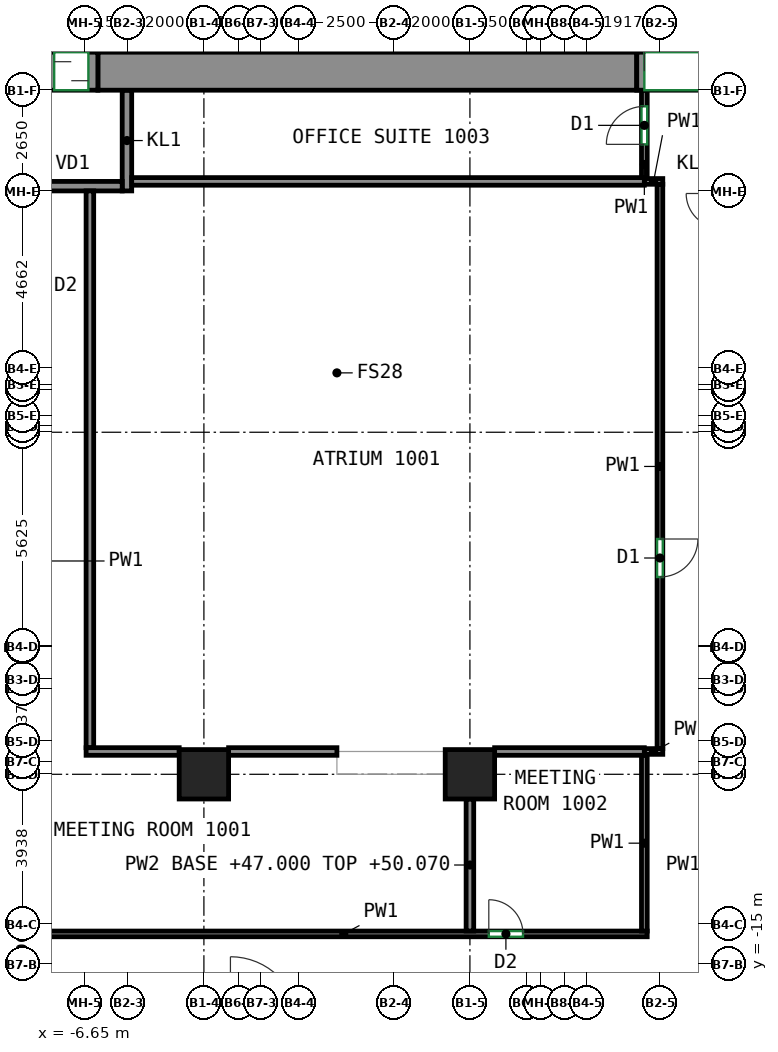
"""IFC4 building model, lengths in metres.
Left out: names, types, materials, properties, quantities, classifications, styles, units other than length and angle.
Written with IfcOpenShell. Run it as: python <this file> out.ifc"""

import sys

from ifc_helpers import new_model, si_unit, direction, frame, frame_2d, origin, origin_2d, place, context, subcontext, project, spatial, rectangle, extrude, source, transform, mapped, element, fill, save


model = new_model("IFC4")
c1 = context("Model", 3, precision=1e-05, world=origin(), true_north=direction((0.0, 1.0)))
c2 = subcontext(c1, "Body", "Model", "MODEL_VIEW")
j1 = project(units=[si_unit("LENGTHUNIT", "METRE"), si_unit("PLANEANGLEUNIT", "RADIAN")], contexts=[c1])
p1 = place(None, origin())
s1 = spatial("IfcSite", under=j1, at=p1, CompositionType="ELEMENT")
p2 = place(p1, origin())
s2 = spatial("IfcBuilding", under=s1, at=p2, CompositionType="ELEMENT")
p3 = place(p2, frame((0.0, 0.0, 47.0)))
s3 = spatial("IfcBuildingStorey", under=s2, at=p3, CompositionType="ELEMENT", Elevation=47.0)
m1 = source(origin(), c2, "Body", "SweptSolid", [
    extrude(rectangle(XDim=1.3, YDim=1.3, at=origin_2d()), origin(), (0.0, 0.0, 1.0), 3.72),
])
for number, where, z_axis, x_axis in (
    (1, (-3.5, -10.0, 0.0), (0.0, 0.0, 1.0), (1.0, 0.0, 0.0)),
    (2, (3.5, -10.0, 0.0), (0.0, 0.0, 1.0), (1.0, 0.0, 0.0)),
):
    element("IfcColumn", number, at=place(p3, frame(where, z_axis=z_axis, x_axis=x_axis)), inside=s3, PredefinedType="COLUMN", context=c2, shape_type="MappedRepresentation", body=[
        mapped(m1, transform((0.0, 0.0, 0.0))),
    ])
m2 = source(origin(), c2, "Body", "SweptSolid", [
    extrude(rectangle(XDim=14.18, YDim=1.0, at=frame_2d((7.09, 0.0))), origin(), (0.0, 0.0, 1.0), 3.72),
])
p4 = place(p3, frame((-6.29, 8.5, 0.0), z_axis=(0.0, 0.0, 1.0), x_axis=(1.0, 0.0, 0.0)))
e3 = element("IfcWall", 3, at=p4, inside=s3, PredefinedType="SHEAR", context=c2, shape_type="MappedRepresentation", body=[
    mapped(m2, transform((0.0, 0.0, 0.0))),
])
m3 = source(origin(), c2, "Body", "SweptSolid", [
    extrude(rectangle(XDim=2.65, YDim=0.25, at=frame_2d((1.325, 0.0))), origin(), (0.0, 0.0, 1.0), 3.72),
])
p5 = place(p3, frame((-5.525, 5.35, 0.0), z_axis=(0.0, 0.0, 1.0), x_axis=(0.0, 1.0, 0.0)))
e4 = element("IfcWall", 4, at=p5, inside=s3, PredefinedType="PARTITIONING", context=c2, shape_type="MappedRepresentation", body=[
    mapped(m3, transform((0.0, 0.0, 0.0))),
])
m4 = source(origin(), c2, "Body", "SweptSolid", [
    extrude(rectangle(XDim=5.36, YDim=0.25, at=frame_2d((2.68, 0.0))), origin(), (0.0, 0.0, 1.0), 3.72),
])
p6 = place(p3, frame((-11.01, 5.475, 0.0), z_axis=(0.0, 0.0, 1.0), x_axis=(1.0, 0.0, 0.0)))
e5 = element("IfcWall", 5, at=p6, inside=s3, PredefinedType="PARTITIONING", context=c2, shape_type="MappedRepresentation", body=[
    mapped(m4, transform((0.0, 0.0, 0.0))),
])
p7 = place(p6, frame((2.28, 0.0, 0.0)))
e6 = element("IfcOpeningElement", 6, at=p7, cuts=e5, PredefinedType="OPENING", context=c2, shape_type="SweptSolid", body=[
    extrude(rectangle(XDim=0.8, YDim=2.0, at=frame_2d((0.4, 1.0))), frame((0.0, 0.135, 0.0), z_axis=(0.0, -1.0, 0.0), x_axis=(1.0, 0.0, 0.0)), (0.0, 0.0, 1.0), 0.27),
])
m5 = source(origin(), c2, "Body", "SweptSolid", [
    extrude(rectangle(XDim=1.4, YDim=1.0, at=frame_2d((0.7, 0.0))), origin(), (0.0, 0.0, 1.0), 2.7),
])
p8 = place(p3, frame((-7.69, 8.5, 0.0), z_axis=(0.0, 0.0, 1.0), x_axis=(1.0, 0.0, 0.0)))
e7 = element("IfcWall", 7, at=p8, inside=s3, PredefinedType="PARTITIONING", context=c2, shape_type="MappedRepresentation", body=[
    mapped(m5, transform((0.0, 0.0, 0.0))),
])
p9 = place(p8, frame((0.25, 0.0, 0.0)))
e8 = element("IfcOpeningElement", 8, at=p9, cuts=e7, PredefinedType="OPENING", context=c2, shape_type="SweptSolid", body=[
    extrude(rectangle(XDim=0.9, YDim=2.1, at=frame_2d((0.45, 1.05))), frame((0.0, 0.51, 0.0), z_axis=(0.0, -1.0, 0.0), x_axis=(1.0, 0.0, 0.0)), (0.0, 0.0, 1.0), 1.02),
])
m6 = source(origin(), c2, "Body", "SweptSolid", [
    extrude(rectangle(XDim=2.4, YDim=1.0, at=frame_2d((1.2, 0.0))), origin(), (0.0, 0.0, 1.0), 2.7),
])
p10 = place(p3, frame((7.89, 8.5, 0.0), z_axis=(0.0, 0.0, 1.0), x_axis=(1.0, 0.0, 0.0)))
e9 = element("IfcWall", 9, at=p10, inside=s3, PredefinedType="PARTITIONING", context=c2, shape_type="MappedRepresentation", body=[
    mapped(m6, transform((0.0, 0.0, 0.0))),
])
p11 = place(p10, frame((0.2, 0.0, 0.0)))
e10 = element("IfcOpeningElement", 10, at=p11, cuts=e9, PredefinedType="OPENING", context=c2, shape_type="SweptSolid", body=[
    extrude(rectangle(XDim=2.0, YDim=2.1, at=frame_2d((1.0, 1.05))), frame((0.0, 0.51, 0.0), z_axis=(0.0, -1.0, 0.0), x_axis=(1.0, 0.0, 0.0)), (0.0, 0.0, 1.0), 1.02),
])
p12 = place(p3, frame((-7.805, -14.2, 0.0), z_axis=(0.0, 0.0, 1.0), x_axis=(1.0, 0.0, 0.0)))
e11 = element("IfcWall", 11, at=p12, inside=s3, PredefinedType="PARTITIONING", context=c2, shape_type="SweptSolid", body=[
    extrude(rectangle(XDim=15.97, YDim=0.15, at=frame_2d((7.985, 0.0))), origin(), (0.0, 0.0, 1.0), 3.72),
])
p13 = place(p12, frame((11.802, 0.0, 0.0)))
e12 = element("IfcOpeningElement", 12, at=p13, cuts=e11, PredefinedType="OPENING", context=c2, shape_type="SweptSolid", body=[
    extrude(rectangle(XDim=0.9, YDim=2.1, at=frame_2d((0.45, 1.05))), frame((0.0, 0.085, 0.0), z_axis=(0.0, -1.0, 0.0), x_axis=(1.0, 0.0, 0.0)), (0.0, 0.0, 1.0), 0.17),
])
p14 = place(p3, frame((8.09, -14.125, 0.0), z_axis=(0.0, 0.0, 1.0), x_axis=(0.0, 1.0, 0.0)))
e13 = element("IfcWall", 13, at=p14, inside=s3, PredefinedType="PARTITIONING", context=c2, shape_type="SweptSolid", body=[
    extrude(rectangle(XDim=4.625, YDim=0.15, at=frame_2d((2.312, 0.0))), origin(), (0.0, 0.0, 1.0), 3.72),
])
p15 = place(p3, frame((8.09, 5.7, 0.0), z_axis=(0.0, 0.0, 1.0), x_axis=(0.0, 1.0, 0.0)))
e14 = element("IfcWall", 14, at=p15, inside=s3, PredefinedType="PARTITIONING", context=c2, shape_type="SweptSolid", body=[
    extrude(rectangle(XDim=2.3, YDim=0.15, at=frame_2d((1.15, 0.0))), origin(), (0.0, 0.0, 1.0), 3.72),
])
p16 = place(p15, frame((0.875, 0.0, 0.0)))
e15 = element("IfcOpeningElement", 15, at=p16, cuts=e14, PredefinedType="OPENING", context=c2, shape_type="SweptSolid", body=[
    extrude(rectangle(XDim=1.0, YDim=2.1, at=frame_2d((0.5, 1.05))), frame((0.0, 0.085, 0.0), z_axis=(0.0, -1.0, 0.0), x_axis=(1.0, 0.0, 0.0)), (0.0, 0.0, 1.0), 0.17),
])
p17 = place(p3, frame((8.575, -9.4, 0.0), z_axis=(0.0, 0.0, 1.0), x_axis=(-1.0, 0.0, 0.0)))
e16 = element("IfcWall", 16, at=p17, inside=s3, PredefinedType="PARTITIONING", context=c2, shape_type="SweptSolid", body=[
    extrude(rectangle(XDim=0.485, YDim=0.15, at=frame_2d((0.242, 0.0))), origin(), (0.0, 0.0, 1.0), 3.72),
])
p18 = place(p3, frame((8.5, 5.525, 0.0), z_axis=(0.0, 0.0, 1.0), x_axis=(0.0, -1.0, 0.0)))
e17 = element("IfcWall", 17, at=p18, inside=s3, PredefinedType="PARTITIONING", context=c2, shape_type="SweptSolid", body=[
    extrude(rectangle(XDim=14.85, YDim=0.15, at=frame_2d((7.425, 0.0))), origin(), (0.0, 0.0, 1.0), 3.72),
])
p19 = place(p18, frame((9.334, 0.0, 0.0)))
e18 = element("IfcOpeningElement", 18, at=p19, cuts=e17, PredefinedType="OPENING", context=c2, shape_type="SweptSolid", body=[
    extrude(rectangle(XDim=1.0, YDim=2.1, at=frame_2d((0.5, 1.05))), frame((0.0, 0.085, 0.0), z_axis=(0.0, -1.0, 0.0), x_axis=(1.0, 0.0, 0.0)), (0.0, 0.0, 1.0), 0.17),
])
p20 = place(p3, frame((8.09, 5.6, 0.0), z_axis=(0.0, 0.0, 1.0), x_axis=(1.0, 0.0, 0.0)))
e19 = element("IfcWall", 19, at=p20, inside=s3, PredefinedType="PARTITIONING", context=c2, shape_type="SweptSolid", body=[
    extrude(rectangle(XDim=0.485, YDim=0.15, at=frame_2d((0.242, 0.0))), origin(), (0.0, 0.0, 1.0), 3.72),
])
p21 = place(p3, frame((3.5, -14.124, 0.0), z_axis=(0.0, 0.0, 1.0), x_axis=(0.0, 1.0, 0.0)))
e20 = element("IfcWall", 20, at=p21, inside=s3, PredefinedType="PARTITIONING", context=c2, shape_type="SweptSolid", body=[
    extrude(rectangle(XDim=3.474, YDim=0.2, at=frame_2d((1.737, 0.0))), origin(), (0.0, 0.0, 1.0), 3.07),
])
p22 = place(p3, frame((-6.5, -9.3, 0.0), z_axis=(0.0, 0.0, 1.0), x_axis=(0.0, 1.0, 0.0)))
e21 = element("IfcWall", 21, at=p22, inside=s3, PredefinedType="PARTITIONING", context=c2, shape_type="SweptSolid", body=[
    extrude(rectangle(XDim=14.65, YDim=0.2, at=frame_2d((7.325, 0.0))), origin(), (0.0, 0.0, 1.0), 3.72),
])
p23 = place(p3, frame((-6.6, -9.4, 0.0), z_axis=(0.0, 0.0, 1.0), x_axis=(1.0, 0.0, 0.0)))
e22 = element("IfcWall", 22, at=p23, inside=s3, PredefinedType="PARTITIONING", context=c2, shape_type="SweptSolid", body=[
    extrude(rectangle(XDim=2.45, YDim=0.2, at=frame_2d((1.225, 0.0))), origin(), (0.0, 0.0, 1.0), 3.72),
])
p24 = place(p3, frame((-2.85, -9.4, 0.0), z_axis=(0.0, 0.0, 1.0), x_axis=(1.0, 0.0, 0.0)))
e23 = element("IfcWall", 23, at=p24, inside=s3, PredefinedType="PARTITIONING", context=c2, shape_type="SweptSolid", body=[
    extrude(rectangle(XDim=2.85, YDim=0.2, at=frame_2d((1.425, 0.0))), origin(), (0.0, 0.0, 1.0), 3.72),
])
p25 = place(p3, frame((4.15, -9.4, 0.0), z_axis=(0.0, 0.0, 1.0), x_axis=(1.0, 0.0, 0.0)))
e24 = element("IfcWall", 24, at=p25, inside=s3, PredefinedType="PARTITIONING", context=c2, shape_type="SweptSolid", body=[
    extrude(rectangle(XDim=3.939, YDim=0.2, at=frame_2d((1.97, 0.0))), origin(), (0.0, 0.0, 1.0), 3.72),
])
p26 = place(p3, frame((-5.4, 5.6, 0.0), z_axis=(0.0, 0.0, 1.0), x_axis=(1.0, 0.0, 0.0)))
e25 = element("IfcWall", 25, at=p26, inside=s3, PredefinedType="PARTITIONING", context=c2, shape_type="SweptSolid", body=[
    extrude(rectangle(XDim=13.489, YDim=0.2, at=frame_2d((6.745, 0.0))), origin(), (0.0, 0.0, 1.0), 3.72),
])
p27 = place(p11, origin())
e26 = element("IfcDoor", 26, at=p27, inside=s3, OperationType="DOUBLE_DOOR_SINGLE_SWING", PredefinedType="DOOR", context=c2, shape_type="SweptSolid", body=[
    extrude(rectangle(XDim=2.0, YDim=2.1, at=frame_2d((1.0, 1.05))), frame((0.0, 0.405, 0.0), z_axis=(0.0, -1.0, 0.0), x_axis=(1.0, 0.0, 0.0)), (0.0, 0.0, 1.0), 0.05),
])
fill(e10, e26)
p28 = place(p9, origin())
e27 = element("IfcDoor", 27, at=p28, inside=s3, OperationType="SLIDING_TO_RIGHT", PredefinedType="DOOR", context=c2, shape_type="SweptSolid", body=[
    extrude(rectangle(XDim=0.9, YDim=2.1, at=frame_2d((0.45, 1.05))), frame((0.0, 0.405, 0.0), z_axis=(0.0, -1.0, 0.0), x_axis=(1.0, 0.0, 0.0)), (0.0, 0.0, 1.0), 0.05),
])
fill(e8, e27)
p29 = place(p13, origin())
e28 = element("IfcDoor", 28, at=p29, inside=s3, OperationType="SINGLE_SWING_LEFT", PredefinedType="DOOR", context=c2, shape_type="SweptSolid", body=[
    extrude(rectangle(XDim=0.9, YDim=2.1, at=frame_2d((0.45, 1.05))), frame((0.0, 0.025, 0.0), z_axis=(0.0, -1.0, 0.0), x_axis=(1.0, 0.0, 0.0)), (0.0, 0.0, 1.0), 0.05),
])
fill(e12, e28)
p30 = place(p19, origin())
e29 = element("IfcDoor", 29, at=p30, inside=s3, OperationType="SINGLE_SWING_LEFT", PredefinedType="DOOR", context=c2, shape_type="SweptSolid", body=[
    extrude(rectangle(XDim=1.0, YDim=2.1, at=frame_2d((0.5, 1.05))), frame((0.0, 0.025, 0.0), z_axis=(0.0, -1.0, 0.0), x_axis=(1.0, 0.0, 0.0)), (0.0, 0.0, 1.0), 0.05),
])
fill(e18, e29)
p31 = place(p16, origin())
e30 = element("IfcDoor", 30, at=p31, inside=s3, OperationType="SINGLE_SWING_LEFT", PredefinedType="DOOR", context=c2, shape_type="SweptSolid", body=[
    extrude(rectangle(XDim=1.0, YDim=2.1, at=frame_2d((0.5, 1.05))), frame((0.0, 0.025, 0.0), z_axis=(0.0, -1.0, 0.0), x_axis=(1.0, 0.0, 0.0)), (0.0, 0.0, 1.0), 0.05),
])
fill(e15, e30)
save(model, sys.argv[1])
